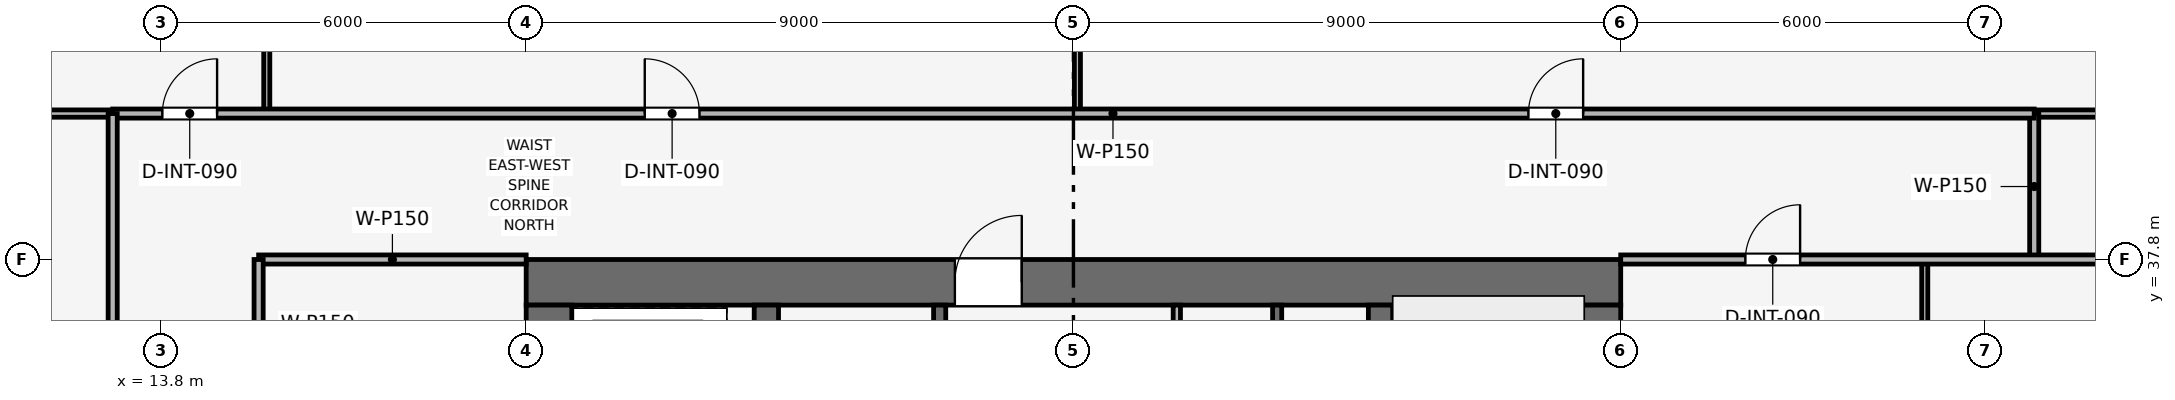
"""IFC4 building model, lengths in metres.
Left out: names, types, materials, properties, quantities, classifications, styles, units other than length and angle.
Written with IfcOpenShell. Run it as: python <this file> out.ifc"""

import sys

from ifc_helpers import new_model, si_unit, direction, frame, frame_2d, origin, place, context, subcontext, project, spatial, rectangle, extrude, element, fill, save


model = new_model("IFC4")
c1 = context("Model", 3, precision=1e-05, world=origin(), true_north=direction((0.0, 1.0)))
c2 = subcontext(c1, "Body", "Model", "MODEL_VIEW")
j1 = project(units=[si_unit("LENGTHUNIT", "METRE"), si_unit("PLANEANGLEUNIT", "RADIAN")], contexts=[c1])
p1 = place(None, origin())
s1 = spatial("IfcSite", under=j1, at=p1, CompositionType="ELEMENT")
p2 = place(p1, origin())
s2 = spatial("IfcBuilding", under=s1, at=p2, CompositionType="ELEMENT")
p3 = place(p2, frame((0.0, 0.0, 241.2)))
s3 = spatial("IfcBuildingStorey", under=s2, at=p3, CompositionType="ELEMENT", Elevation=241.2)
p4 = place(p3, frame((19.8, 37.425, 0.0), z_axis=(0.0, 0.0, 1.0), x_axis=(1.0, 0.0, 0.0)))
e1 = element("IfcWall", 1, at=p4, inside=s3, PredefinedType="SHEAR", context=c2, shape_type="SweptSolid", body=[
    extrude(rectangle(XDim=18.0, YDim=0.75, at=frame_2d((9.0, 0.0))), origin(), (0.0, 0.0, 1.0), 5.4),
])
p5 = place(p4, frame((7.05, 0.0, 0.0)))
e2 = element("IfcOpeningElement", 2, at=p5, cuts=e1, PredefinedType="OPENING", context=c2, shape_type="SweptSolid", body=[
    extrude(rectangle(XDim=1.1, YDim=2.15, at=frame_2d((0.55, 1.075))), frame((0.0, 0.385, 0.0), z_axis=(0.0, -1.0, 0.0), x_axis=(1.0, 0.0, 0.0)), (0.0, 0.0, 1.0), 0.77),
])
p6 = place(p3, frame((20.175, 20.55, 0.0), z_axis=(0.0, 0.0, 1.0), x_axis=(0.0, 1.0, 0.0)))
e3 = element("IfcWall", 3, at=p6, inside=s3, PredefinedType="SHEAR", context=c2, shape_type="SweptSolid", body=[
    extrude(rectangle(XDim=16.5, YDim=0.75, at=frame_2d((8.25, 0.0))), origin(), (0.0, 0.0, 1.0), 5.4),
])
p7 = place(p6, frame((10.25, 0.0, 0.0)))
e4 = element("IfcOpeningElement", 4, at=p7, cuts=e3, PredefinedType="OPENING", context=c2, shape_type="SweptSolid", body=[
    extrude(rectangle(XDim=1.1, YDim=2.15, at=frame_2d((0.55, 1.075))), frame((0.0, 0.385, 0.0), z_axis=(0.0, -1.0, 0.0), x_axis=(1.0, 0.0, 0.0)), (0.0, 0.0, 1.0), 0.77),
])
p8 = place(p3, frame((37.425, 20.55, 0.0), z_axis=(0.0, 0.0, 1.0), x_axis=(0.0, 1.0, 0.0)))
e5 = element("IfcWall", 5, at=p8, inside=s3, PredefinedType="SHEAR", context=c2, shape_type="SweptSolid", body=[
    extrude(rectangle(XDim=16.5, YDim=0.75, at=frame_2d((8.25, 0.0))), origin(), (0.0, 0.0, 1.0), 5.4),
])
p9 = place(p8, frame((4.75, 0.0, 0.0)))
e6 = element("IfcOpeningElement", 6, at=p9, cuts=e5, PredefinedType="OPENING", context=c2, shape_type="SweptSolid", body=[
    extrude(rectangle(XDim=1.1, YDim=2.15, at=frame_2d((0.55, 1.075))), frame((0.0, 0.385, 0.0), z_axis=(0.0, -1.0, 0.0), x_axis=(1.0, 0.0, 0.0)), (0.0, 0.0, 1.0), 0.77),
])
for number, where, z_axis, x_axis in (
    (7, (23.75, 20.55, 0.0), (0.0, 0.0, 1.0), (0.0, 1.0, 0.0)),
    (8, (33.85, 20.55, 0.0), (0.0, 0.0, 1.0), (0.0, 1.0, 0.0)),
):
    element("IfcWall", number, at=place(p3, frame(where, z_axis=z_axis, x_axis=x_axis)), inside=s3, PredefinedType="SHEAR", context=c2, shape_type="SweptSolid", body=[
        extrude(rectangle(XDim=16.5, YDim=0.4, at=frame_2d((8.25, 0.0))), origin(), (0.0, 0.0, 1.0), 5.4),
    ])
p10 = place(p3, frame((32.15, 34.0, 0.0), z_axis=(0.0, 0.0, 1.0), x_axis=(0.0, 1.0, 0.0)))
e9 = element("IfcWall", 9, at=p10, inside=s3, PredefinedType="SHEAR", context=c2, shape_type="SweptSolid", body=[
    extrude(rectangle(XDim=3.05, YDim=0.15, at=frame_2d((1.525, 0.0))), origin(), (0.0, 0.0, 1.0), 5.15),
])
p11 = place(p3, frame((26.6, 34.0, 0.0), z_axis=(0.0, 0.0, 1.0), x_axis=(0.0, 1.0, 0.0)))
e10 = element("IfcWall", 10, at=p11, inside=s3, PredefinedType="SHEAR", context=c2, shape_type="SweptSolid", body=[
    extrude(rectangle(XDim=3.05, YDim=0.2, at=frame_2d((1.525, 0.0))), origin(), (0.0, 0.0, 1.0), 5.15),
])
p12 = place(p11, frame((0.75, 0.0, 0.0)))
e11 = element("IfcOpeningElement", 11, at=p12, cuts=e10, PredefinedType="OPENING", context=c2, shape_type="SweptSolid", body=[
    extrude(rectangle(XDim=1.1, YDim=2.15, at=frame_2d((0.55, 1.075))), frame((0.0, 0.11, 0.0), z_axis=(0.0, -1.0, 0.0), x_axis=(1.0, 0.0, 0.0)), (0.0, 0.0, 1.0), 0.22),
])
p13 = place(p3, frame((30.5, 33.925, 0.0), z_axis=(0.0, 0.0, 1.0), x_axis=(0.0, 1.0, 0.0)))
e12 = element("IfcWall", 12, at=p13, inside=s3, PredefinedType="PARTITIONING", context=c2, shape_type="SweptSolid", body=[
    extrude(rectangle(XDim=3.125, YDim=0.12, at=frame_2d((1.562, 0.0))), origin(), (0.0, 0.0, 1.0), 5.15),
])
p14 = place(p13, frame((0.85, 0.0, 0.0)))
e13 = element("IfcOpeningElement", 13, at=p14, cuts=e12, PredefinedType="OPENING", context=c2, shape_type="SweptSolid", body=[
    extrude(rectangle(XDim=0.9, YDim=2.1, at=frame_2d((0.45, 1.05))), frame((0.0, 0.07, 0.0), z_axis=(0.0, -1.0, 0.0), x_axis=(1.0, 0.0, 0.0)), (0.0, 0.0, 1.0), 0.14),
])
p15 = place(p3, frame((15.4, 37.8, 0.0), z_axis=(0.0, 0.0, 1.0), x_axis=(1.0, 0.0, 0.0)))
e14 = element("IfcWall", 14, at=p15, inside=s3, PredefinedType="PARTITIONING", context=c2, shape_type="SweptSolid", body=[
    extrude(rectangle(XDim=4.4, YDim=0.15, at=frame_2d((2.2, 0.0))), origin(), (0.0, 0.0, 1.0), 4.735),
])
p16 = place(p3, frame((15.4, 32.45, 0.0), z_axis=(0.0, 0.0, 1.0), x_axis=(0.0, 1.0, 0.0)))
e15 = element("IfcWall", 15, at=p16, inside=s3, PredefinedType="PARTITIONING", context=c2, shape_type="SweptSolid", body=[
    extrude(rectangle(XDim=5.35, YDim=0.15, at=frame_2d((2.675, 0.0))), origin(), (0.0, 0.0, 1.0), 4.735),
])
p17 = place(p16, frame((2.1, 0.0, 0.0)))
e16 = element("IfcOpeningElement", 16, at=p17, cuts=e15, PredefinedType="OPENING", context=c2, shape_type="SweptSolid", body=[
    extrude(rectangle(XDim=0.9, YDim=2.1, at=frame_2d((0.45, 1.05))), frame((0.0, 0.085, 0.0), z_axis=(0.0, -1.0, 0.0), x_axis=(1.0, 0.0, 0.0)), (0.0, 0.0, 1.0), 0.17),
])
for number, where, z_axis, x_axis in (
    (17, (15.534, 40.2, 0.0), (0.0, 0.0, 1.0), (0.0, 1.0, 0.0)),
    (18, (28.865, 40.2, 0.0), (0.0, 0.0, 1.0), (0.0, 1.0, 0.0)),
):
    element("IfcWall", number, at=place(p3, frame(where, z_axis=z_axis, x_axis=x_axis)), inside=s3, PredefinedType="MOVABLE", context=c2, shape_type="SweptSolid", body=[
        extrude(rectangle(XDim=15.47, YDim=0.1, at=frame_2d((7.735, 0.0))), origin(), (0.0, 0.0, 1.0), 4.735),
    ])
p18 = place(p3, frame((42.8, 26.85, 0.0), z_axis=(0.0, 0.0, 1.0), x_axis=(0.0, 1.0, 0.0)))
e19 = element("IfcWall", 19, at=p18, inside=s3, PredefinedType="MOVABLE", context=c2, shape_type="SweptSolid", body=[
    extrude(rectangle(XDim=10.95, YDim=0.1, at=frame_2d((5.475, 0.0))), origin(), (0.0, 0.0, 1.0), 4.735),
])
p19 = place(p18, frame((5.025, 0.0, 0.0)))
e20 = element("IfcOpeningElement", 20, at=p19, cuts=e19, PredefinedType="OPENING", context=c2, shape_type="SweptSolid", body=[
    extrude(rectangle(XDim=0.9, YDim=2.1, at=frame_2d((0.45, 1.05))), frame((0.0, 0.06, 0.0), z_axis=(0.0, -1.0, 0.0), x_axis=(1.0, 0.0, 0.0)), (0.0, 0.0, 1.0), 0.12),
])
p20 = place(p3, frame((1.93, 40.2, 0.0), z_axis=(0.0, 0.0, 1.0), x_axis=(1.0, 0.0, 0.0)))
e21 = element("IfcWall", 21, at=p20, inside=s3, PredefinedType="PARTITIONING", context=c2, shape_type="SweptSolid", body=[
    extrude(rectangle(XDim=11.07, YDim=0.12, at=frame_2d((5.535, 0.0))), origin(), (0.0, 0.0, 1.0), 4.735),
])
p21 = place(p3, frame((44.6, 40.2, 0.0), z_axis=(0.0, 0.0, 1.0), x_axis=(1.0, 0.0, 0.0)))
e22 = element("IfcWall", 22, at=p21, inside=s3, PredefinedType="PARTITIONING", context=c2, shape_type="SweptSolid", body=[
    extrude(rectangle(XDim=11.07, YDim=0.12, at=frame_2d((5.535, 0.0))), origin(), (0.0, 0.0, 1.0), 4.735),
])
p22 = place(p3, frame((44.6, 37.8, 0.0), z_axis=(0.0, 0.0, 1.0), x_axis=(0.0, 1.0, 0.0)))
e23 = element("IfcWall", 23, at=p22, inside=s3, PredefinedType="PARTITIONING", context=c2, shape_type="SweptSolid", body=[
    extrude(rectangle(XDim=2.4, YDim=0.15, at=frame_2d((1.2, 0.0))), origin(), (0.0, 0.0, 1.0), 5.15),
])
p23 = place(p3, frame((37.8, 37.8, 0.0), z_axis=(0.0, 0.0, 1.0), x_axis=(1.0, 0.0, 0.0)))
e24 = element("IfcWall", 24, at=p23, inside=s3, PredefinedType="PARTITIONING", context=c2, shape_type="SweptSolid", body=[
    extrude(rectangle(XDim=17.87, YDim=0.15, at=frame_2d((8.935, 0.0))), origin(), (0.0, 0.0, 1.0), 4.735),
])
p24 = place(p23, frame((2.05, 0.0, 0.0)))
e25 = element("IfcOpeningElement", 25, at=p24, cuts=e24, PredefinedType="OPENING", context=c2, shape_type="SweptSolid", body=[
    extrude(rectangle(XDim=0.9, YDim=2.1, at=frame_2d((0.45, 1.05))), frame((0.0, 0.085, 0.0), z_axis=(0.0, -1.0, 0.0), x_axis=(1.0, 0.0, 0.0)), (0.0, 0.0, 1.0), 0.17),
])
p25 = place(p3, frame((13.0, 40.2, 0.0), z_axis=(0.0, 0.0, 1.0), x_axis=(1.0, 0.0, 0.0)))
e26 = element("IfcWall", 26, at=p25, inside=s3, PredefinedType="PARTITIONING", context=c2, shape_type="SweptSolid", body=[
    extrude(rectangle(XDim=31.6, YDim=0.15, at=frame_2d((15.8, 0.0))), origin(), (0.0, 0.0, 1.0), 4.735),
])
p26 = place(p25, frame((0.817, 0.0, 0.0)))
e27 = element("IfcOpeningElement", 27, at=p26, cuts=e26, PredefinedType="OPENING", context=c2, shape_type="SweptSolid", body=[
    extrude(rectangle(XDim=0.9, YDim=2.1, at=frame_2d((0.45, 1.05))), frame((0.0, 0.085, 0.0), z_axis=(0.0, -1.0, 0.0), x_axis=(1.0, 0.0, 0.0)), (0.0, 0.0, 1.0), 0.17),
])
p27 = place(p25, frame((8.75, 0.0, 0.0)))
e28 = element("IfcOpeningElement", 28, at=p27, cuts=e26, PredefinedType="OPENING", context=c2, shape_type="SweptSolid", body=[
    extrude(rectangle(XDim=0.9, YDim=2.1, at=frame_2d((0.45, 1.05))), frame((0.0, 0.085, 0.0), z_axis=(0.0, -1.0, 0.0), x_axis=(1.0, 0.0, 0.0)), (0.0, 0.0, 1.0), 0.17),
])
p28 = place(p25, frame((23.282, 0.0, 0.0)))
e29 = element("IfcOpeningElement", 29, at=p28, cuts=e26, PredefinedType="OPENING", context=c2, shape_type="SweptSolid", body=[
    extrude(rectangle(XDim=0.9, YDim=2.1, at=frame_2d((0.45, 1.05))), frame((0.0, 0.085, 0.0), z_axis=(0.0, -1.0, 0.0), x_axis=(1.0, 0.0, 0.0)), (0.0, 0.0, 1.0), 0.17),
])
p29 = place(p3, frame((13.0, 17.4, 0.0), z_axis=(0.0, 0.0, 1.0), x_axis=(0.0, 1.0, 0.0)))
e30 = element("IfcWall", 30, at=p29, inside=s3, PredefinedType="PARTITIONING", context=c2, shape_type="SweptSolid", body=[
    extrude(rectangle(XDim=22.8, YDim=0.15, at=frame_2d((11.4, 0.0))), origin(), (0.0, 0.0, 1.0), 4.735),
])
p30 = place(p29, frame((10.95, 0.0, 0.0)))
e31 = element("IfcOpeningElement", 31, at=p30, cuts=e30, PredefinedType="OPENING", context=c2, shape_type="SweptSolid", body=[
    extrude(rectangle(XDim=0.9, YDim=2.1, at=frame_2d((0.45, 1.05))), frame((0.0, 0.085, 0.0), z_axis=(0.0, -1.0, 0.0), x_axis=(1.0, 0.0, 0.0)), (0.0, 0.0, 1.0), 0.17),
])
p31 = place(p24, origin())
e32 = element("IfcDoor", 32, at=p31, inside=s3, OperationType="SINGLE_SWING_RIGHT", PredefinedType="DOOR", context=c2, shape_type="SweptSolid", body=[
    extrude(rectangle(XDim=0.9, YDim=2.1, at=frame_2d((0.45, 1.05))), frame((0.0, 0.025, 0.0), z_axis=(0.0, -1.0, 0.0), x_axis=(1.0, 0.0, 0.0)), (0.0, 0.0, 1.0), 0.05),
])
fill(e25, e32)
p32 = place(p26, origin())
e33 = element("IfcDoor", 33, at=p32, inside=s3, OperationType="SINGLE_SWING_RIGHT", PredefinedType="DOOR", context=c2, shape_type="SweptSolid", body=[
    extrude(rectangle(XDim=0.9, YDim=2.1, at=frame_2d((0.45, 1.05))), frame((0.0, 0.025, 0.0), z_axis=(0.0, -1.0, 0.0), x_axis=(1.0, 0.0, 0.0)), (0.0, 0.0, 1.0), 0.05),
])
fill(e27, e33)
p33 = place(p27, origin())
e34 = element("IfcDoor", 34, at=p33, inside=s3, OperationType="SINGLE_SWING_LEFT", PredefinedType="DOOR", context=c2, shape_type="SweptSolid", body=[
    extrude(rectangle(XDim=0.9, YDim=2.1, at=frame_2d((0.45, 1.05))), frame((0.0, 0.025, 0.0), z_axis=(0.0, -1.0, 0.0), x_axis=(1.0, 0.0, 0.0)), (0.0, 0.0, 1.0), 0.05),
])
fill(e28, e34)
p34 = place(p28, origin())
e35 = element("IfcDoor", 35, at=p34, inside=s3, OperationType="SINGLE_SWING_RIGHT", PredefinedType="DOOR", context=c2, shape_type="SweptSolid", body=[
    extrude(rectangle(XDim=0.9, YDim=2.1, at=frame_2d((0.45, 1.05))), frame((0.0, 0.025, 0.0), z_axis=(0.0, -1.0, 0.0), x_axis=(1.0, 0.0, 0.0)), (0.0, 0.0, 1.0), 0.05),
])
fill(e29, e35)
p35 = place(p5, origin())
e36 = element("IfcDoor", 36, at=p35, inside=s3, OperationType="SINGLE_SWING_RIGHT", PredefinedType="DOOR", context=c2, shape_type="SweptSolid", body=[
    extrude(rectangle(XDim=1.1, YDim=2.15, at=frame_2d((0.55, 1.075))), frame((0.0, 0.025, 0.0), z_axis=(0.0, -1.0, 0.0), x_axis=(1.0, 0.0, 0.0)), (0.0, 0.0, 1.0), 0.05),
])
fill(e2, e36)
save(model, sys.argv[1])
